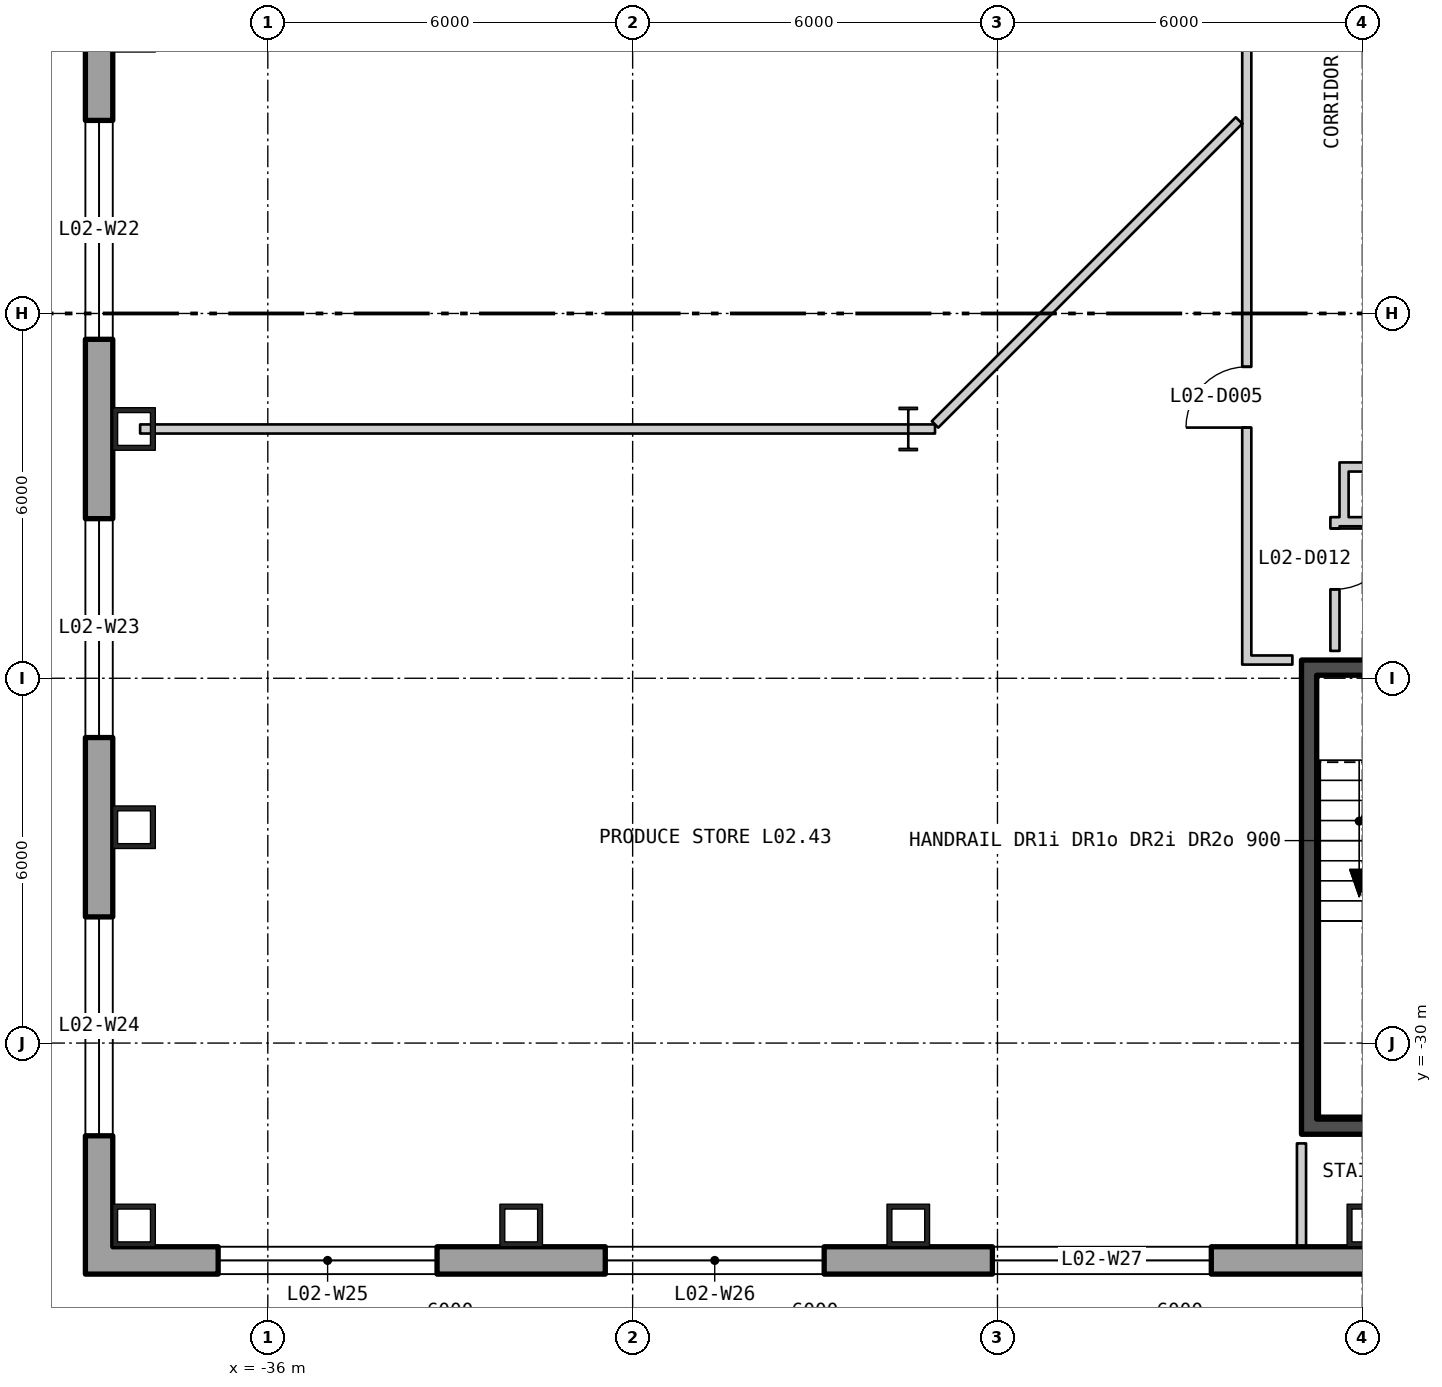
"""IFC4 building model, lengths in metres.
Left out: names, types, materials, properties, quantities, classifications, styles, units other than length and angle.
Written with IfcOpenShell. Run it as: python <this file> out.ifc"""

import sys

from ifc_helpers import new_model, si_unit, direction, frame, frame_2d, origin, origin_2d, place, context, subcontext, project, spatial, polyline, rectangle, hollow_rectangle, i_section, outline, extrude, element, fill, save


model = new_model("IFC4")
c1 = context("Model", 3, precision=1e-05, world=origin(), true_north=direction((0.0, 1.0)))
c2 = subcontext(c1, "Body", "Model", "MODEL_VIEW")
j1 = project(units=[si_unit("LENGTHUNIT", "METRE"), si_unit("PLANEANGLEUNIT", "RADIAN")], contexts=[c1])
p1 = place(None, origin())
s1 = spatial("IfcSite", under=j1, at=p1, CompositionType="ELEMENT")
p2 = place(p1, origin())
s2 = spatial("IfcBuilding", under=s1, at=p2, CompositionType="ELEMENT")
p3 = place(p2, frame((0.0, 0.0, 13.5)))
s3 = spatial("IfcBuildingStorey", under=s2, at=p3, CompositionType="ELEMENT", Elevation=13.5)
for number, where, z_axis, x_axis in (
    (1, (-38.2, -19.9, 0.0), (0.0, 0.0, 1.0), (0.0, -1.0, 0.0)),
    (2, (-38.2, -26.45, 0.0), (0.0, 0.0, 1.0), (0.0, -1.0, 0.0)),
    (3, (-38.2, -33.0, 0.0), (0.0, 0.0, 1.0), (1.0, 0.0, 0.0)),
    (4, (-31.833, -33.0, 0.0), (0.0, 0.0, 1.0), (1.0, 0.0, 0.0)),
    (5, (-25.467, -33.0, 0.0), (0.0, 0.0, 1.0), (1.0, 0.0, 0.0)),
    (6, (-17.9, -33.0, 0.0), (0.0, 0.0, 1.0), (1.0, 0.0, 0.0)),
):
    element("IfcColumn", number, at=place(p3, frame(where, z_axis=z_axis, x_axis=x_axis)), inside=s3, PredefinedType="COLUMN", context=c2, shape_type="SweptSolid", body=[
        extrude(hollow_rectangle(XDim=0.7, YDim=0.7, WallThickness=0.08, at=origin_2d()), origin(), (0.0, 0.0, 1.0), 5.1),
    ])
p4 = place(p3, frame((-25.467, -19.9, 0.0), z_axis=(0.0, 0.0, 1.0), x_axis=(1.0, 0.0, 0.0)))
e7 = element("IfcColumn", 7, at=p4, inside=s3, PredefinedType="COLUMN", context=c2, shape_type="SweptSolid", body=[
    extrude(i_section(OverallWidth=0.304, OverallDepth=0.716, WebThickness=0.021, FlangeThickness=0.04, at=origin_2d()), origin(), (0.0, 0.0, 1.0), 5.1),
])
p5 = place(p3, frame((-38.775, 19.975, -0.4), z_axis=(0.0, 0.0, 1.0), x_axis=(0.0, -1.0, 0.0)))
e8 = element("IfcWall", 8, at=p5, inside=s3, PredefinedType="SOLIDWALL", context=c2, shape_type="SweptSolid", body=[
    extrude(outline(polyline([(-0.225, -0.225), (53.775, -0.225), (53.325, 0.225), (0.225, 0.225), (-0.225, -0.225)])), origin(), (0.0, 0.0, 1.0), 5.1),
])
p6 = place(p5, frame((2.05, 0.0, 1.3)))
e9 = element("IfcOpeningElement", 9, at=p6, cuts=e8, PredefinedType="OPENING", context=c2, shape_type="SweptSolid", body=[
    extrude(rectangle(XDim=3.6, YDim=3.2, at=frame_2d((1.8, 1.6))), frame((0.0, 0.235, 0.0), z_axis=(0.0, -1.0, 0.0), x_axis=(1.0, 0.0, 0.0)), (0.0, 0.0, 1.0), 0.47),
])
p7 = place(p5, frame((8.6, 0.0, 1.3)))
e10 = element("IfcOpeningElement", 10, at=p7, cuts=e8, PredefinedType="OPENING", context=c2, shape_type="SweptSolid", body=[
    extrude(rectangle(XDim=3.6, YDim=3.2, at=frame_2d((1.8, 1.6))), frame((0.0, 0.235, 0.0), z_axis=(0.0, -1.0, 0.0), x_axis=(1.0, 0.0, 0.0)), (0.0, 0.0, 1.0), 0.47),
])
p8 = place(p5, frame((15.15, 0.0, 1.3)))
e11 = element("IfcOpeningElement", 11, at=p8, cuts=e8, PredefinedType="OPENING", context=c2, shape_type="SweptSolid", body=[
    extrude(rectangle(XDim=3.6, YDim=3.2, at=frame_2d((1.8, 1.6))), frame((0.0, 0.235, 0.0), z_axis=(0.0, -1.0, 0.0), x_axis=(1.0, 0.0, 0.0)), (0.0, 0.0, 1.0), 0.47),
])
p9 = place(p5, frame((21.7, 0.0, 1.3)))
e12 = element("IfcOpeningElement", 12, at=p9, cuts=e8, PredefinedType="OPENING", context=c2, shape_type="SweptSolid", body=[
    extrude(rectangle(XDim=3.6, YDim=3.2, at=frame_2d((1.8, 1.6))), frame((0.0, 0.235, 0.0), z_axis=(0.0, -1.0, 0.0), x_axis=(1.0, 0.0, 0.0)), (0.0, 0.0, 1.0), 0.47),
])
p10 = place(p5, frame((28.25, 0.0, 1.3)))
e13 = element("IfcOpeningElement", 13, at=p10, cuts=e8, PredefinedType="OPENING", context=c2, shape_type="SweptSolid", body=[
    extrude(rectangle(XDim=3.6, YDim=3.2, at=frame_2d((1.8, 1.6))), frame((0.0, 0.235, 0.0), z_axis=(0.0, -1.0, 0.0), x_axis=(1.0, 0.0, 0.0)), (0.0, 0.0, 1.0), 0.47),
])
p11 = place(p5, frame((34.8, 0.0, 1.3)))
e14 = element("IfcOpeningElement", 14, at=p11, cuts=e8, PredefinedType="OPENING", context=c2, shape_type="SweptSolid", body=[
    extrude(rectangle(XDim=3.6, YDim=3.2, at=frame_2d((1.8, 1.6))), frame((0.0, 0.235, 0.0), z_axis=(0.0, -1.0, 0.0), x_axis=(1.0, 0.0, 0.0)), (0.0, 0.0, 1.0), 0.47),
])
p12 = place(p5, frame((41.35, 0.0, 1.3)))
e15 = element("IfcOpeningElement", 15, at=p12, cuts=e8, PredefinedType="OPENING", context=c2, shape_type="SweptSolid", body=[
    extrude(rectangle(XDim=3.6, YDim=3.2, at=frame_2d((1.8, 1.6))), frame((0.0, 0.235, 0.0), z_axis=(0.0, -1.0, 0.0), x_axis=(1.0, 0.0, 0.0)), (0.0, 0.0, 1.0), 0.47),
])
p13 = place(p5, frame((47.9, 0.0, 1.3)))
e16 = element("IfcOpeningElement", 16, at=p13, cuts=e8, PredefinedType="OPENING", context=c2, shape_type="SweptSolid", body=[
    extrude(rectangle(XDim=3.6, YDim=3.2, at=frame_2d((1.8, 1.6))), frame((0.0, 0.235, 0.0), z_axis=(0.0, -1.0, 0.0), x_axis=(1.0, 0.0, 0.0)), (0.0, 0.0, 1.0), 0.47),
])
p14 = place(p3, frame((-38.775, -33.575, -0.4), z_axis=(0.0, 0.0, 1.0), x_axis=(1.0, 0.0, 0.0)))
e17 = element("IfcWall", 17, at=p14, inside=s3, PredefinedType="SOLIDWALL", context=c2, shape_type="SweptSolid", body=[
    extrude(outline(polyline([(-0.225, -0.225), (77.775, -0.225), (77.325, 0.225), (0.225, 0.225), (-0.225, -0.225)])), origin(), (0.0, 0.0, 1.0), 5.1),
])
p15 = place(p14, frame((1.958, 0.0, 1.3)))
e18 = element("IfcOpeningElement", 18, at=p15, cuts=e17, PredefinedType="OPENING", context=c2, shape_type="SweptSolid", body=[
    extrude(rectangle(XDim=3.6, YDim=3.2, at=frame_2d((1.8, 1.6))), frame((0.0, 0.235, 0.0), z_axis=(0.0, -1.0, 0.0), x_axis=(1.0, 0.0, 0.0)), (0.0, 0.0, 1.0), 0.47),
])
p16 = place(p14, frame((8.325, 0.0, 1.3)))
e19 = element("IfcOpeningElement", 19, at=p16, cuts=e17, PredefinedType="OPENING", context=c2, shape_type="SweptSolid", body=[
    extrude(rectangle(XDim=3.6, YDim=3.2, at=frame_2d((1.8, 1.6))), frame((0.0, 0.235, 0.0), z_axis=(0.0, -1.0, 0.0), x_axis=(1.0, 0.0, 0.0)), (0.0, 0.0, 1.0), 0.47),
])
p17 = place(p14, frame((14.692, 0.0, 1.3)))
e20 = element("IfcOpeningElement", 20, at=p17, cuts=e17, PredefinedType="OPENING", context=c2, shape_type="SweptSolid", body=[
    extrude(rectangle(XDim=3.6, YDim=3.2, at=frame_2d((1.8, 1.6))), frame((0.0, 0.235, 0.0), z_axis=(0.0, -1.0, 0.0), x_axis=(1.0, 0.0, 0.0)), (0.0, 0.0, 1.0), 0.47),
])
p18 = place(p14, frame((21.325, 0.0, 1.3)))
e21 = element("IfcOpeningElement", 21, at=p18, cuts=e17, PredefinedType="OPENING", context=c2, shape_type="SweptSolid", body=[
    extrude(rectangle(XDim=3.6, YDim=3.2, at=frame_2d((1.8, 1.6))), frame((0.0, 0.235, 0.0), z_axis=(0.0, -1.0, 0.0), x_axis=(1.0, 0.0, 0.0)), (0.0, 0.0, 1.0), 0.47),
])
p19 = place(p14, frame((27.425, 0.0, 1.3)))
e22 = element("IfcOpeningElement", 22, at=p19, cuts=e17, PredefinedType="OPENING", context=c2, shape_type="SweptSolid", body=[
    extrude(rectangle(XDim=3.6, YDim=3.2, at=frame_2d((1.8, 1.6))), frame((0.0, 0.235, 0.0), z_axis=(0.0, -1.0, 0.0), x_axis=(1.0, 0.0, 0.0)), (0.0, 0.0, 1.0), 0.47),
])
p20 = place(p14, frame((33.792, 0.0, 1.3)))
e23 = element("IfcOpeningElement", 23, at=p20, cuts=e17, PredefinedType="OPENING", context=c2, shape_type="SweptSolid", body=[
    extrude(rectangle(XDim=3.6, YDim=3.2, at=frame_2d((1.8, 1.6))), frame((0.0, 0.235, 0.0), z_axis=(0.0, -1.0, 0.0), x_axis=(1.0, 0.0, 0.0)), (0.0, 0.0, 1.0), 0.47),
])
p21 = place(p14, frame((40.158, 0.0, 1.3)))
e24 = element("IfcOpeningElement", 24, at=p21, cuts=e17, PredefinedType="OPENING", context=c2, shape_type="SweptSolid", body=[
    extrude(rectangle(XDim=3.6, YDim=3.2, at=frame_2d((1.8, 1.6))), frame((0.0, 0.235, 0.0), z_axis=(0.0, -1.0, 0.0), x_axis=(1.0, 0.0, 0.0)), (0.0, 0.0, 1.0), 0.47),
])
p22 = place(p14, frame((46.525, 0.0, 1.3)))
e25 = element("IfcOpeningElement", 25, at=p22, cuts=e17, PredefinedType="OPENING", context=c2, shape_type="SweptSolid", body=[
    extrude(rectangle(XDim=3.6, YDim=3.2, at=frame_2d((1.8, 1.6))), frame((0.0, 0.235, 0.0), z_axis=(0.0, -1.0, 0.0), x_axis=(1.0, 0.0, 0.0)), (0.0, 0.0, 1.0), 0.47),
])
p23 = place(p14, frame((52.625, 0.0, 1.3)))
e26 = element("IfcOpeningElement", 26, at=p23, cuts=e17, PredefinedType="OPENING", context=c2, shape_type="SweptSolid", body=[
    extrude(rectangle(XDim=3.6, YDim=3.2, at=frame_2d((1.8, 1.6))), frame((0.0, 0.235, 0.0), z_axis=(0.0, -1.0, 0.0), x_axis=(1.0, 0.0, 0.0)), (0.0, 0.0, 1.0), 0.47),
])
p24 = place(p14, frame((59.258, 0.0, 1.3)))
e27 = element("IfcOpeningElement", 27, at=p24, cuts=e17, PredefinedType="OPENING", context=c2, shape_type="SweptSolid", body=[
    extrude(rectangle(XDim=3.6, YDim=3.2, at=frame_2d((1.8, 1.6))), frame((0.0, 0.235, 0.0), z_axis=(0.0, -1.0, 0.0), x_axis=(1.0, 0.0, 0.0)), (0.0, 0.0, 1.0), 0.47),
])
p25 = place(p14, frame((65.625, 0.0, 1.3)))
e28 = element("IfcOpeningElement", 28, at=p25, cuts=e17, PredefinedType="OPENING", context=c2, shape_type="SweptSolid", body=[
    extrude(rectangle(XDim=3.6, YDim=3.2, at=frame_2d((1.8, 1.6))), frame((0.0, 0.235, 0.0), z_axis=(0.0, -1.0, 0.0), x_axis=(1.0, 0.0, 0.0)), (0.0, 0.0, 1.0), 0.47),
])
p26 = place(p14, frame((71.992, 0.0, 1.3)))
e29 = element("IfcOpeningElement", 29, at=p26, cuts=e17, PredefinedType="OPENING", context=c2, shape_type="SweptSolid", body=[
    extrude(rectangle(XDim=3.6, YDim=3.2, at=frame_2d((1.8, 1.6))), frame((0.0, 0.235, 0.0), z_axis=(0.0, -1.0, 0.0), x_axis=(1.0, 0.0, 0.0)), (0.0, 0.0, 1.0), 0.47),
])
p27 = place(p3, frame((-18.875, -31.25, 0.0), z_axis=(0.0, 0.0, 1.0), x_axis=(0.0, 1.0, 0.0)))
e30 = element("IfcWall", 30, at=p27, inside=s3, PredefinedType="SHEAR", context=c2, shape_type="SweptSolid", body=[
    extrude(rectangle(XDim=7.3, YDim=0.25, at=frame_2d((3.65, 0.0))), origin(), (0.0, 0.0, 1.0), 4.88),
])
p28 = place(p3, frame((-19.0, -31.375, 0.0), z_axis=(0.0, 0.0, 1.0), x_axis=(1.0, 0.0, 0.0)))
e31 = element("IfcWall", 31, at=p28, inside=s3, PredefinedType="SHEAR", context=c2, shape_type="SweptSolid", body=[
    extrude(rectangle(XDim=3.5, YDim=0.25, at=frame_2d((1.75, 0.0))), origin(), (0.0, 0.0, 1.0), 4.88),
])
p29 = place(p3, frame((-19.0, -23.825, 0.0), z_axis=(0.0, 0.0, 1.0), x_axis=(1.0, 0.0, 0.0)))
e32 = element("IfcWall", 32, at=p29, inside=s3, PredefinedType="SHEAR", context=c2, shape_type="SweptSolid", body=[
    extrude(rectangle(XDim=3.5, YDim=0.25, at=frame_2d((1.75, 0.0))), origin(), (0.0, 0.0, 1.0), 4.88),
])
p30 = place(p29, frame((1.15, 0.0, 0.0)))
e33 = element("IfcOpeningElement", 33, at=p30, cuts=e32, PredefinedType="OPENING", context=c2, shape_type="SweptSolid", body=[
    extrude(rectangle(XDim=1.2, YDim=2.1, at=frame_2d((0.6, 1.05))), frame((0.0, 0.135, 0.0), z_axis=(0.0, -1.0, 0.0), x_axis=(1.0, 0.0, 0.0)), (0.0, 0.0, 1.0), 0.27),
])
p31 = place(p3, frame((-38.1, -19.9, 0.0), z_axis=(0.0, 0.0, 1.0), x_axis=(1.0, 0.0, 0.0)))
e34 = element("IfcWall", 34, at=p31, inside=s3, PredefinedType="PARTITIONING", context=c2, shape_type="SweptSolid", body=[
    extrude(rectangle(XDim=12.633, YDim=0.15, at=frame_2d((6.316, 0.0))), origin(), (0.0, 0.0, 1.0), 4.09),
])
p32 = place(p3, frame((-25.467, -19.9, 0.0), z_axis=(0.0, 0.0, 1.0), x_axis=(1.0, 0.0, 0.0)))
e35 = element("IfcWall", 35, at=p32, inside=s3, PredefinedType="PARTITIONING", context=c2, shape_type="SweptSolid", body=[
    extrude(rectangle(XDim=0.44, YDim=0.15, at=frame_2d((0.22, 0.0))), origin(), (0.0, 0.0, 1.0), 4.88),
])
p33 = place(p3, frame((-25.027, -19.825, 0.0), z_axis=(0.0, 0.0, 1.0), x_axis=(0.707106781187, 0.707106781187, 0.0)))
e36 = element("IfcWall", 36, at=p33, inside=s3, PredefinedType="PARTITIONING", context=c2, shape_type="SweptSolid", body=[
    extrude(rectangle(XDim=7.07, YDim=0.15, at=frame_2d((3.535, 0.0))), origin(), (0.0, 0.0, 1.0), 4.88),
])
p34 = place(p3, frame((-19.9, -23.775, 0.0), z_axis=(0.0, 0.0, 1.0), x_axis=(0.0, 1.0, 0.0)))
e37 = element("IfcWall", 37, at=p34, inside=s3, PredefinedType="PARTITIONING", context=c2, shape_type="SweptSolid", body=[
    extrude(rectangle(XDim=21.187, YDim=0.15, at=frame_2d((10.594, 0.0))), origin(), (0.0, 0.0, 1.0), 4.88),
])
p35 = place(p34, frame((3.898, 0.0, 0.0)))
e38 = element("IfcOpeningElement", 38, at=p35, cuts=e37, PredefinedType="OPENING", context=c2, shape_type="SweptSolid", body=[
    extrude(rectangle(XDim=1.0, YDim=2.1, at=frame_2d((0.5, 1.05))), frame((0.0, 0.085, 0.0), z_axis=(0.0, -1.0, 0.0), x_axis=(1.0, 0.0, 0.0)), (0.0, 0.0, 1.0), 0.17),
])
p36 = place(p34, frame((10.832, 0.0, 0.0)))
e39 = element("IfcOpeningElement", 39, at=p36, cuts=e37, PredefinedType="OPENING", context=c2, shape_type="SweptSolid", body=[
    extrude(rectangle(XDim=1.0, YDim=2.1, at=frame_2d((0.5, 1.05))), frame((0.0, 0.085, 0.0), z_axis=(0.0, -1.0, 0.0), x_axis=(1.0, 0.0, 0.0)), (0.0, 0.0, 1.0), 0.17),
])
p37 = place(p34, frame((14.688, 0.0, 0.0)))
e40 = element("IfcOpeningElement", 40, at=p37, cuts=e37, PredefinedType="OPENING", context=c2, shape_type="SweptSolid", body=[
    extrude(rectangle(XDim=1.0, YDim=2.1, at=frame_2d((0.5, 1.05))), frame((0.0, 0.085, 0.0), z_axis=(0.0, -1.0, 0.0), x_axis=(1.0, 0.0, 0.0)), (0.0, 0.0, 1.0), 0.17),
])
p38 = place(p3, frame((-19.825, -23.7, 0.0), z_axis=(0.0, 0.0, 1.0), x_axis=(1.0, 0.0, 0.0)))
e41 = element("IfcWall", 41, at=p38, inside=s3, PredefinedType="PARTITIONING", context=c2, shape_type="SweptSolid", body=[
    extrude(rectangle(XDim=0.675, YDim=0.15, at=frame_2d((0.338, 0.0))), origin(), (0.0, 0.0, 1.0), 4.88),
])
p39 = place(p3, frame((-19.0, -33.348, 0.0), z_axis=(0.0, 0.0, 1.0), x_axis=(0.0, 1.0, 0.0)))
e42 = element("IfcWall", 42, at=p39, inside=s3, PredefinedType="PARTITIONING", context=c2, shape_type="SweptSolid", body=[
    extrude(rectangle(XDim=0.448, YDim=0.15, at=frame_2d((0.224, 0.0))), origin(), (0.0, 0.0, 1.0), 4.88),
])
p40 = place(p3, frame((-19.0, -32.9, 0.0), z_axis=(0.0, 0.0, 1.0), x_axis=(0.0, 1.0, 0.0)))
e43 = element("IfcWall", 43, at=p40, inside=s3, PredefinedType="PARTITIONING", context=c2, shape_type="SweptSolid", body=[
    extrude(rectangle(XDim=1.25, YDim=0.15, at=frame_2d((0.625, 0.0))), origin(), (0.0, 0.0, 1.0), 4.19),
])
p41 = place(p3, frame((-18.45, -23.55, 0.0), z_axis=(0.0, 0.0, 1.0), x_axis=(0.0, 1.0, 0.0)))
e44 = element("IfcWall", 44, at=p41, inside=s3, PredefinedType="PARTITIONING", context=c2, shape_type="SweptSolid", body=[
    extrude(rectangle(XDim=2.2, YDim=0.15, at=frame_2d((1.1, 0.0))), origin(), (0.0, 0.0, 1.0), 4.88),
])
p42 = place(p41, frame((1.013, 0.0, 0.0)))
e45 = element("IfcOpeningElement", 45, at=p42, cuts=e44, PredefinedType="OPENING", context=c2, shape_type="SweptSolid", body=[
    extrude(rectangle(XDim=1.0, YDim=2.1, at=frame_2d((0.5, 1.05))), frame((0.0, 0.085, 0.0), z_axis=(0.0, -1.0, 0.0), x_axis=(1.0, 0.0, 0.0)), (0.0, 0.0, 1.0), 0.17),
])
p43 = place(p3, frame((-18.3, -21.5, 0.0), z_axis=(0.0, 0.0, 1.0), x_axis=(0.0, 1.0, 0.0)))
e46 = element("IfcWall", 46, at=p43, inside=s3, PredefinedType="PARTITIONING", context=c2, shape_type="SweptSolid", body=[
    extrude(rectangle(XDim=1.05, YDim=0.15, at=frame_2d((0.525, 0.0))), origin(), (0.0, 0.0, 1.0), 4.88),
])
for number, where, z_axis, x_axis in (
    (47, (-18.225, -21.425, 0.0), (0.0, 0.0, 1.0), (1.0, 0.0, 0.0)),
    (48, (-18.225, -20.525, 0.0), (0.0, 0.0, 1.0), (1.0, 0.0, 0.0)),
):
    element("IfcWall", number, at=place(p3, frame(where, z_axis=z_axis, x_axis=x_axis)), inside=s3, PredefinedType="PARTITIONING", context=c2, shape_type="SweptSolid", body=[
        extrude(rectangle(XDim=0.65, YDim=0.15, at=frame_2d((0.325, 0.0))), origin(), (0.0, 0.0, 1.0), 4.88),
    ])
p44 = place(p11, origin())
e49 = element("IfcWindow", 49, at=p44, inside=s3, PartitioningType="SINGLE_PANEL", PredefinedType="WINDOW", context=c2, shape_type="SweptSolid", body=[
    extrude(rectangle(XDim=3.6, YDim=3.2, at=frame_2d((1.8, 1.6))), frame((0.0, 0.105, 0.0), z_axis=(0.0, -1.0, 0.0), x_axis=(1.0, 0.0, 0.0)), (0.0, 0.0, 1.0), 0.06),
])
fill(e14, e49)
p45 = place(p12, origin())
e50 = element("IfcWindow", 50, at=p45, inside=s3, PartitioningType="SINGLE_PANEL", PredefinedType="WINDOW", context=c2, shape_type="SweptSolid", body=[
    extrude(rectangle(XDim=3.6, YDim=3.2, at=frame_2d((1.8, 1.6))), frame((0.0, 0.105, 0.0), z_axis=(0.0, -1.0, 0.0), x_axis=(1.0, 0.0, 0.0)), (0.0, 0.0, 1.0), 0.06),
])
fill(e15, e50)
p46 = place(p13, origin())
e51 = element("IfcWindow", 51, at=p46, inside=s3, PartitioningType="SINGLE_PANEL", PredefinedType="WINDOW", context=c2, shape_type="SweptSolid", body=[
    extrude(rectangle(XDim=3.6, YDim=3.2, at=frame_2d((1.8, 1.6))), frame((0.0, 0.105, 0.0), z_axis=(0.0, -1.0, 0.0), x_axis=(1.0, 0.0, 0.0)), (0.0, 0.0, 1.0), 0.06),
])
fill(e16, e51)
p47 = place(p15, origin())
e52 = element("IfcWindow", 52, at=p47, inside=s3, PartitioningType="SINGLE_PANEL", PredefinedType="WINDOW", context=c2, shape_type="SweptSolid", body=[
    extrude(rectangle(XDim=3.6, YDim=3.2, at=frame_2d((1.8, 1.6))), frame((0.0, 0.105, 0.0), z_axis=(0.0, -1.0, 0.0), x_axis=(1.0, 0.0, 0.0)), (0.0, 0.0, 1.0), 0.06),
])
fill(e18, e52)
p48 = place(p16, origin())
e53 = element("IfcWindow", 53, at=p48, inside=s3, PartitioningType="SINGLE_PANEL", PredefinedType="WINDOW", context=c2, shape_type="SweptSolid", body=[
    extrude(rectangle(XDim=3.6, YDim=3.2, at=frame_2d((1.8, 1.6))), frame((0.0, 0.105, 0.0), z_axis=(0.0, -1.0, 0.0), x_axis=(1.0, 0.0, 0.0)), (0.0, 0.0, 1.0), 0.06),
])
fill(e19, e53)
p49 = place(p17, origin())
e54 = element("IfcWindow", 54, at=p49, inside=s3, PartitioningType="SINGLE_PANEL", PredefinedType="WINDOW", context=c2, shape_type="SweptSolid", body=[
    extrude(rectangle(XDim=3.6, YDim=3.2, at=frame_2d((1.8, 1.6))), frame((0.0, 0.105, 0.0), z_axis=(0.0, -1.0, 0.0), x_axis=(1.0, 0.0, 0.0)), (0.0, 0.0, 1.0), 0.06),
])
fill(e20, e54)
p50 = place(p35, origin())
e55 = element("IfcDoor", 55, at=p50, inside=s3, OperationType="SINGLE_SWING_RIGHT", PredefinedType="DOOR", context=c2, shape_type="SweptSolid", body=[
    extrude(rectangle(XDim=1.0, YDim=2.1, at=frame_2d((0.5, 1.05))), frame((0.0, 0.025, 0.0), z_axis=(0.0, -1.0, 0.0), x_axis=(1.0, 0.0, 0.0)), (0.0, 0.0, 1.0), 0.05),
])
fill(e38, e55)
p51 = place(p42, origin())
e56 = element("IfcDoor", 56, at=p51, inside=s3, OperationType="SINGLE_SWING_RIGHT", PredefinedType="DOOR", context=c2, shape_type="SweptSolid", body=[
    extrude(rectangle(XDim=1.0, YDim=2.1, at=frame_2d((0.5, 1.05))), frame((0.0, 0.025, 0.0), z_axis=(0.0, -1.0, 0.0), x_axis=(1.0, 0.0, 0.0)), (0.0, 0.0, 1.0), 0.05),
])
fill(e45, e56)
save(model, sys.argv[1])
